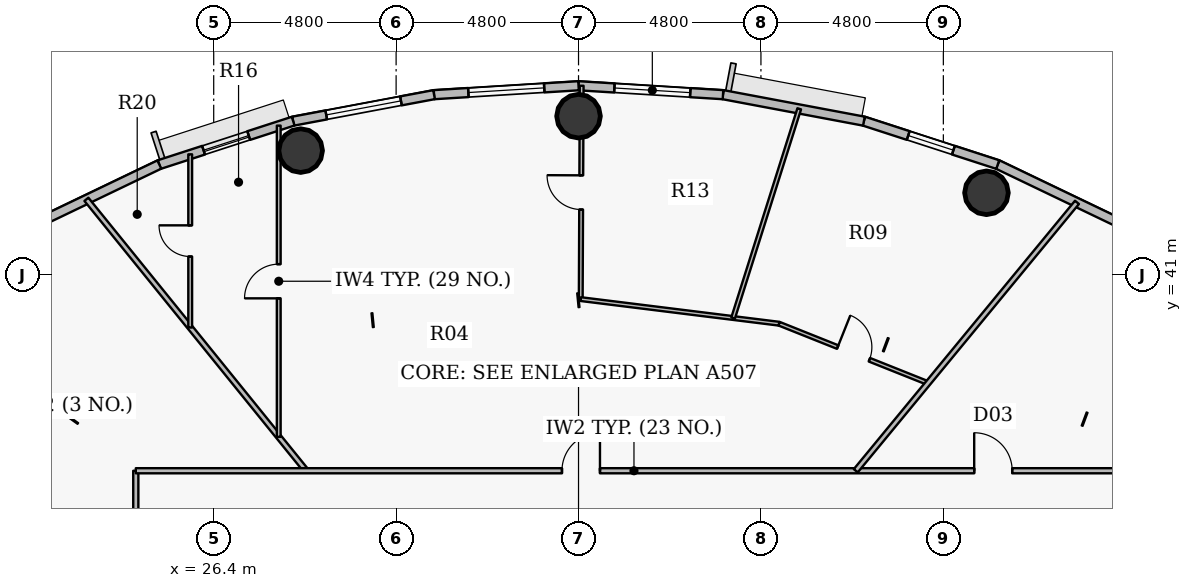
"""IFC4 building model, lengths in metres.
Left out: names, types, materials, properties, quantities, classifications, styles, units other than length and angle.
Written with IfcOpenShell. Run it as: python <this file> out.ifc"""

import sys

from ifc_helpers import new_model, si_unit, direction, frame, frame_2d, origin, origin_2d, place, context, subcontext, project, spatial, rectangle, hollow_circle, extrude, source, transform, mapped, element, fill, save


model = new_model("IFC4")
c1 = context("Model", 3, precision=1e-05, world=origin(), true_north=direction((0.0, 1.0)))
c2 = subcontext(c1, "Body", "Model", "MODEL_VIEW")
j1 = project(units=[si_unit("LENGTHUNIT", "METRE"), si_unit("PLANEANGLEUNIT", "RADIAN")], contexts=[c1])
p1 = place(None, origin())
s1 = spatial("IfcSite", under=j1, at=p1, CompositionType="ELEMENT")
p2 = place(p1, origin())
s2 = spatial("IfcBuilding", under=s1, at=p2, CompositionType="ELEMENT")
p3 = place(p2, frame((0.0, 0.0, 247.8)))
s3 = spatial("IfcBuildingStorey", under=s2, at=p3, CompositionType="ELEMENT", Elevation=247.8)
for number, where, z_axis, x_axis in (
    (1, (46.735, 43.164, 0.0), (0.0, 0.0, 1.0), (1.0, 0.0, 0.0)),
    (2, (36.0, 45.18, 0.0), (0.0, 0.0, 1.0), (1.0, 0.0, 0.0)),
    (3, (28.688, 44.273, 0.0), (0.0, 0.0, 1.0), (1.0, 0.0, 0.0)),
):
    element("IfcColumn", number, at=place(p3, frame(where, z_axis=z_axis, x_axis=x_axis)), inside=s3, PredefinedType="COLUMN", context=c2, shape_type="SweptSolid", body=[
        extrude(hollow_circle(Radius=0.575, WallThickness=0.036, at=origin_2d()), origin(), (0.0, 0.0, 1.0), 3.75),
    ])
p4 = place(p3, frame((47.031, 43.906, 0.0), z_axis=(0.0, 0.0, 1.0), x_axis=(0.901598104751, -0.432574684313, 0.0)))
e4 = element("IfcWall", 4, at=p4, inside=s3, PredefinedType="SOLIDWALL", context=c2, shape_type="SweptSolid", body=[
    extrude(rectangle(XDim=3.604, YDim=0.24, at=frame_2d((1.802, 0.0))), origin(), (0.0, 0.0, 1.0), 3.5),
])
p5 = place(p3, frame((43.509, 45.049, 0.0), z_axis=(0.0, 0.0, 1.0), x_axis=(0.951210789182, -0.308541787354, 0.0)))
e5 = element("IfcWall", 5, at=p5, inside=s3, PredefinedType="SOLIDWALL", context=c2, shape_type="SweptSolid", body=[
    extrude(rectangle(XDim=3.702, YDim=0.24, at=frame_2d((1.851, 0.0))), origin(), (0.0, 0.0, 1.0), 3.5),
])
p6 = place(p5, frame((1.226, 0.0, 0.9)))
e6 = element("IfcOpeningElement", 6, at=p6, cuts=e5, PredefinedType="OPENING", context=c2, shape_type="SweptSolid", body=[
    extrude(rectangle(XDim=1.25, YDim=1.65, at=origin_2d()), frame((0.625, 0.13, 0.825), z_axis=(0.0, -1.0, 0.0), x_axis=(1.0, 0.0, 0.0)), (0.0, 0.0, 1.0), 0.26),
])
p7 = place(p3, frame((39.802, 45.746, 0.0), z_axis=(0.0, 0.0, 1.0), x_axis=(0.982784898575, -0.184753465822, 0.0)))
e7 = element("IfcWall", 7, at=p7, inside=s3, PredefinedType="SOLIDWALL", context=c2, shape_type="SweptSolid", body=[
    extrude(rectangle(XDim=3.773, YDim=0.24, at=frame_2d((1.886, 0.0))), origin(), (0.0, 0.0, 1.0), 3.5),
])
p8 = place(p3, frame((36.0, 45.98, 0.0), z_axis=(0.0, 0.0, 1.0), x_axis=(0.998108785312, -0.06147237333, 0.0)))
e8 = element("IfcWall", 8, at=p8, inside=s3, PredefinedType="SOLIDWALL", context=c2, shape_type="SweptSolid", body=[
    extrude(rectangle(XDim=3.809, YDim=0.24, at=frame_2d((1.904, 0.0))), origin(), (0.0, 0.0, 1.0), 3.5),
])
p9 = place(p8, frame((0.946, 0.0, 0.9)))
e9 = element("IfcOpeningElement", 9, at=p9, cuts=e8, PredefinedType="OPENING", context=c2, shape_type="SweptSolid", body=[
    extrude(rectangle(XDim=2.0, YDim=1.75, at=origin_2d()), frame((1.0, 0.13, 0.875), z_axis=(0.0, -1.0, 0.0), x_axis=(1.0, 0.0, 0.0)), (0.0, 0.0, 1.0), 0.26),
])
p10 = place(p3, frame((32.198, 45.746, 0.0), z_axis=(0.0, 0.0, 1.0), x_axis=(0.998108785312, 0.06147237333, 0.0)))
e10 = element("IfcWall", 10, at=p10, inside=s3, PredefinedType="SOLIDWALL", context=c2, shape_type="SweptSolid", body=[
    extrude(rectangle(XDim=3.809, YDim=0.24, at=frame_2d((1.904, 0.0))), origin(), (0.0, 0.0, 1.0), 3.5),
])
p11 = place(p10, frame((0.905, 0.0, 0.9)))
e11 = element("IfcOpeningElement", 11, at=p11, cuts=e10, PredefinedType="OPENING", context=c2, shape_type="SweptSolid", body=[
    extrude(rectangle(XDim=2.0, YDim=1.75, at=origin_2d()), frame((1.0, 0.13, 0.875), z_axis=(0.0, -1.0, 0.0), x_axis=(1.0, 0.0, 0.0)), (0.0, 0.0, 1.0), 0.26),
])
p12 = place(p3, frame((28.491, 45.049, 0.0), z_axis=(0.0, 0.0, 1.0), x_axis=(0.982784898575, 0.184753465822, 0.0)))
e12 = element("IfcWall", 12, at=p12, inside=s3, PredefinedType="SOLIDWALL", context=c2, shape_type="SweptSolid", body=[
    extrude(rectangle(XDim=3.773, YDim=0.24, at=frame_2d((1.886, 0.0))), origin(), (0.0, 0.0, 1.0), 3.5),
])
p13 = place(p12, frame((0.886, 0.0, 0.9)))
e13 = element("IfcOpeningElement", 13, at=p13, cuts=e12, PredefinedType="OPENING", context=c2, shape_type="SweptSolid", body=[
    extrude(rectangle(XDim=2.0, YDim=1.75, at=origin_2d()), frame((1.0, 0.13, 0.875), z_axis=(0.0, -1.0, 0.0), x_axis=(1.0, 0.0, 0.0)), (0.0, 0.0, 1.0), 0.26),
])
p14 = place(p3, frame((24.969, 43.906, 0.0), z_axis=(0.0, 0.0, 1.0), x_axis=(0.951210789182, 0.308541787354, 0.0)))
e14 = element("IfcWall", 14, at=p14, inside=s3, PredefinedType="SOLIDWALL", context=c2, shape_type="SweptSolid", body=[
    extrude(rectangle(XDim=3.702, YDim=0.24, at=frame_2d((1.851, 0.0))), origin(), (0.0, 0.0, 1.0), 3.5),
])
p15 = place(p14, frame((1.223, 0.0, 0.9)))
e15 = element("IfcOpeningElement", 15, at=p15, cuts=e14, PredefinedType="OPENING", context=c2, shape_type="SweptSolid", body=[
    extrude(rectangle(XDim=1.25, YDim=1.65, at=origin_2d()), frame((0.625, 0.13, 0.825), z_axis=(0.0, -1.0, 0.0), x_axis=(1.0, 0.0, 0.0)), (0.0, 0.0, 1.0), 0.26),
])
p16 = place(p3, frame((21.72, 42.348, 0.0), z_axis=(0.0, 0.0, 1.0), x_axis=(0.901598104751, 0.432574684313, 0.0)))
e16 = element("IfcWall", 16, at=p16, inside=s3, PredefinedType="SOLIDWALL", context=c2, shape_type="SweptSolid", body=[
    extrude(rectangle(XDim=3.604, YDim=0.24, at=frame_2d((1.802, 0.0))), origin(), (0.0, 0.0, 1.0), 3.5),
])
p17 = place(p3, frame((23.05, 42.991, 0.0), z_axis=(0.0, 0.0, 1.0), x_axis=(0.629320507303, -0.777145867317, 0.0)))
e17 = element("IfcWall", 17, at=p17, inside=s3, PredefinedType="PARTITIONING", context=c2, shape_type="SweptSolid", body=[
    extrude(rectangle(XDim=9.189, YDim=0.135, at=frame_2d((4.595, 0.0))), origin(), (0.0, 0.0, 1.0), 2.985),
])
p18 = place(p3, frame((24.35, 28.019, 0.0), z_axis=(0.0, 0.0, 1.0), x_axis=(0.0, 1.0, 0.0)))
e18 = element("IfcWall", 18, at=p18, inside=s3, PredefinedType="PARTITIONING", context=c2, shape_type="SweptSolid", body=[
    extrude(rectangle(XDim=7.831, YDim=0.135, at=frame_2d((3.916, 0.0))), origin(), (0.0, 0.0, 1.0), 2.935),
])
p19 = place(p18, frame((4.435, 0.0, 0.0)))
e19 = element("IfcOpeningElement", 19, at=p19, cuts=e18, PredefinedType="OPENING", context=c2, shape_type="SweptSolid", body=[
    extrude(rectangle(XDim=1.05, YDim=2.15, at=origin_2d()), frame((0.525, 0.078, 1.075), z_axis=(0.0, -1.0, 0.0), x_axis=(1.0, 0.0, 0.0)), (0.0, 0.0, 1.0), 0.155),
])
p20 = place(p18, frame((0.674, 0.0, 0.0)))
e20 = element("IfcOpeningElement", 20, at=p20, cuts=e18, PredefinedType="OPENING", context=c2, shape_type="SweptSolid", body=[
    extrude(rectangle(XDim=0.82, YDim=2.1, at=origin_2d()), frame((0.41, 0.078, 1.05), z_axis=(0.0, -1.0, 0.0), x_axis=(1.0, 0.0, 0.0)), (0.0, 0.0, 1.0), 0.155),
])
p21 = place(p3, frame((24.35, 35.85, 0.0), z_axis=(0.0, 0.0, 1.0), x_axis=(1.0, 0.0, 0.0)))
e21 = element("IfcWall", 21, at=p21, inside=s3, PredefinedType="PARTITIONING", context=c2, shape_type="SweptSolid", body=[
    extrude(rectangle(XDim=26.218, YDim=0.135, at=frame_2d((13.109, 0.0))), origin(), (0.0, 0.0, 1.0), 2.935),
])
p22 = place(p21, frame((22.062, 0.0, 0.0)))
e22 = element("IfcOpeningElement", 22, at=p22, cuts=e21, PredefinedType="OPENING", context=c2, shape_type="SweptSolid", body=[
    extrude(rectangle(XDim=1.0, YDim=2.15, at=origin_2d()), frame((0.5, 0.078, 1.075), z_axis=(0.0, -1.0, 0.0), x_axis=(1.0, 0.0, 0.0)), (0.0, 0.0, 1.0), 0.155),
])
p23 = place(p21, frame((11.214, 0.0, 0.0)))
e23 = element("IfcOpeningElement", 23, at=p23, cuts=e21, PredefinedType="OPENING", context=c2, shape_type="SweptSolid", body=[
    extrude(rectangle(XDim=1.0, YDim=2.15, at=origin_2d()), frame((0.5, 0.078, 1.075), z_axis=(0.0, -1.0, 0.0), x_axis=(1.0, 0.0, 0.0)), (0.0, 0.0, 1.0), 0.155),
])
p24 = place(p3, frame((25.782, 39.619, 0.0), z_axis=(0.0, 0.0, 1.0), x_axis=(0.0, 1.0, 0.0)))
e24 = element("IfcWall", 24, at=p24, inside=s3, PredefinedType="PARTITIONING", context=c2, shape_type="SweptSolid", body=[
    extrude(rectangle(XDim=4.557, YDim=0.1, at=frame_2d((2.278, 0.0))), origin(), (0.0, 0.0, 1.0), 2.985),
])
p25 = place(p24, frame((1.868, 0.0, 0.0)))
e25 = element("IfcOpeningElement", 25, at=p25, cuts=e24, PredefinedType="OPENING", context=c2, shape_type="SweptSolid", body=[
    extrude(rectangle(XDim=0.82, YDim=2.1, at=origin_2d()), frame((0.41, 0.06, 1.05), z_axis=(0.0, -1.0, 0.0), x_axis=(1.0, 0.0, 0.0)), (0.0, 0.0, 1.0), 0.12),
])
p26 = place(p3, frame((28.111, 36.742, 0.0), z_axis=(0.0, 0.0, 1.0), x_axis=(0.0, 1.0, 0.0)))
e26 = element("IfcWall", 26, at=p26, inside=s3, PredefinedType="PARTITIONING", context=c2, shape_type="SweptSolid", body=[
    extrude(rectangle(XDim=8.189, YDim=0.1, at=frame_2d((4.095, 0.0))), origin(), (0.0, 0.0, 1.0), 2.985),
])
p27 = place(p26, frame((3.645, 0.0, 0.0)))
e27 = element("IfcOpeningElement", 27, at=p27, cuts=e26, PredefinedType="OPENING", context=c2, shape_type="SweptSolid", body=[
    extrude(rectangle(XDim=0.9, YDim=2.1, at=origin_2d()), frame((0.45, 0.06, 1.05), z_axis=(0.0, -1.0, 0.0), x_axis=(1.0, 0.0, 0.0)), (0.0, 0.0, 1.0), 0.12),
])
p28 = place(p3, frame((36.058, 40.366, 0.0), z_axis=(0.0, 0.0, 1.0), x_axis=(0.004348919472, 0.999990543405, 0.0)))
e28 = element("IfcWall", 28, at=p28, inside=s3, PredefinedType="PARTITIONING", context=c2, shape_type="SweptSolid", body=[
    extrude(rectangle(XDim=5.614, YDim=0.1, at=frame_2d((2.807, 0.0))), origin(), (0.0, 0.0, 1.0), 2.935),
])
p29 = place(p28, frame((2.357, 0.0, 0.0)))
e29 = element("IfcOpeningElement", 29, at=p29, cuts=e28, PredefinedType="OPENING", context=c2, shape_type="SweptSolid", body=[
    extrude(rectangle(XDim=0.9, YDim=2.1, at=origin_2d()), frame((0.45, 0.06, 1.05), z_axis=(0.0, -1.0, 0.0), x_axis=(1.0, 0.0, 0.0)), (0.0, 0.0, 1.0), 0.12),
])
p30 = place(p3, frame((36.058, 40.366, 0.0), z_axis=(0.0, 0.0, 1.0), x_axis=(0.9924002173, -0.123052056879, 0.0)))
e30 = element("IfcWall", 30, at=p30, inside=s3, PredefinedType="PARTITIONING", context=c2, shape_type="SweptSolid", body=[
    extrude(rectangle(XDim=5.26, YDim=0.1, at=frame_2d((2.63, 0.0))), origin(), (0.0, 0.0, 1.0), 2.935),
])
p31 = place(p3, frame((40.068, 39.869, 0.0), z_axis=(0.0, 0.0, 1.0), x_axis=(0.301434937635, 0.953486747875, 0.0)))
e31 = element("IfcWall", 31, at=p31, inside=s3, PredefinedType="PARTITIONING", context=c2, shape_type="SweptSolid", body=[
    extrude(rectangle(XDim=5.773, YDim=0.1, at=frame_2d((2.887, 0.0))), origin(), (0.0, 0.0, 1.0), 2.985),
])
p32 = place(p3, frame((41.278, 39.719, 0.0), z_axis=(0.0, 0.0, 1.0), x_axis=(0.928799648329, -0.370582262478, 0.0)))
e32 = element("IfcWall", 32, at=p32, inside=s3, PredefinedType="PARTITIONING", context=c2, shape_type="SweptSolid", body=[
    extrude(rectangle(XDim=4.218, YDim=0.1, at=frame_2d((2.109, 0.0))), origin(), (0.0, 0.0, 1.0), 2.935),
])
p33 = place(p32, frame((1.659, 0.0, 0.0)))
e33 = element("IfcOpeningElement", 33, at=p33, cuts=e32, PredefinedType="OPENING", context=c2, shape_type="SweptSolid", body=[
    extrude(rectangle(XDim=0.9, YDim=2.1, at=origin_2d()), frame((0.45, 0.06, 1.05), z_axis=(0.0, -1.0, 0.0), x_axis=(1.0, 0.0, 0.0)), (0.0, 0.0, 1.0), 0.12),
])
p34 = place(p3, frame((43.295, 35.85, 0.0), z_axis=(0.0, 0.0, 1.0), x_axis=(0.636076542552, 0.771625966395, 0.0)))
e34 = element("IfcWall", 34, at=p34, inside=s3, PredefinedType="PARTITIONING", context=c2, shape_type="SweptSolid", body=[
    extrude(rectangle(XDim=9.151, YDim=0.135, at=frame_2d((4.576, 0.0))), origin(), (0.0, 0.0, 1.0), 2.985),
])
m1 = source(origin(), c2, "Body", "SweptSolid", [
    extrude(rectangle(XDim=2.0, YDim=1.75, at=origin_2d()), frame((1.0, 0.03, 0.875), z_axis=(0.0, -1.0, 0.0), x_axis=(1.0, 0.0, 0.0)), (0.0, 0.0, 1.0), 0.06),
])
p35 = place(p9, origin())
e35 = element("IfcWindow", 35, at=p35, inside=s3, PartitioningType="DOUBLE_PANEL_VERTICAL", PredefinedType="WINDOW", context=c2, shape_type="MappedRepresentation", body=[
    mapped(m1, transform((0.0, 0.0, 0.0), x_axis=(1.0, 0.0, 0.0), y_axis=(0.0, 1.0, 0.0), z_axis=(0.0, 0.0, 1.0), scale=1.0)),
])
fill(e9, e35)
p36 = place(p11, origin())
e36 = element("IfcWindow", 36, at=p36, inside=s3, PartitioningType="DOUBLE_PANEL_VERTICAL", PredefinedType="WINDOW", context=c2, shape_type="MappedRepresentation", body=[
    mapped(m1, transform((0.0, 0.0, 0.0), x_axis=(1.0, 0.0, 0.0), y_axis=(0.0, 1.0, 0.0), z_axis=(0.0, 0.0, 1.0), scale=1.0)),
])
fill(e11, e36)
p37 = place(p13, origin())
e37 = element("IfcWindow", 37, at=p37, inside=s3, PartitioningType="DOUBLE_PANEL_VERTICAL", PredefinedType="WINDOW", context=c2, shape_type="MappedRepresentation", body=[
    mapped(m1, transform((0.0, 0.0, 0.0), x_axis=(1.0, 0.0, 0.0), y_axis=(0.0, 1.0, 0.0), z_axis=(0.0, 0.0, 1.0), scale=1.0)),
])
fill(e13, e37)
m2 = source(origin(), c2, "Body", "SweptSolid", [
    extrude(rectangle(XDim=1.25, YDim=1.65, at=origin_2d()), frame((0.625, 0.03, 0.825), z_axis=(0.0, -1.0, 0.0), x_axis=(1.0, 0.0, 0.0)), (0.0, 0.0, 1.0), 0.06),
])
p38 = place(p15, origin())
e38 = element("IfcWindow", 38, at=p38, inside=s3, PartitioningType="SINGLE_PANEL", PredefinedType="WINDOW", context=c2, shape_type="MappedRepresentation", body=[
    mapped(m2, transform((0.0, 0.0, 0.0), x_axis=(1.0, 0.0, 0.0), y_axis=(0.0, 1.0, 0.0), z_axis=(0.0, 0.0, 1.0), scale=1.0)),
])
fill(e15, e38)
p39 = place(p6, origin())
e39 = element("IfcWindow", 39, at=p39, inside=s3, PartitioningType="SINGLE_PANEL", PredefinedType="WINDOW", context=c2, shape_type="MappedRepresentation", body=[
    mapped(m2, transform((0.0, 0.0, 0.0), x_axis=(1.0, 0.0, 0.0), y_axis=(0.0, 1.0, 0.0), z_axis=(0.0, 0.0, 1.0), scale=1.0)),
])
fill(e6, e39)
m3 = source(origin(), c2, "Body", "SweptSolid", [
    extrude(rectangle(XDim=1.0, YDim=2.15, at=origin_2d()), frame((0.5, 0.025, 1.075), z_axis=(0.0, -1.0, 0.0), x_axis=(1.0, 0.0, 0.0)), (0.0, 0.0, 1.0), 0.05),
])
p40 = place(p22, origin())
e40 = element("IfcDoor", 40, at=p40, inside=s3, OperationType="SINGLE_SWING_LEFT", PredefinedType="DOOR", context=c2, shape_type="MappedRepresentation", body=[
    mapped(m3, transform((0.0, 0.0, 0.0), x_axis=(1.0, 0.0, 0.0), y_axis=(0.0, 1.0, 0.0), z_axis=(0.0, 0.0, 1.0), scale=1.0)),
])
fill(e22, e40)
p41 = place(p23, origin())
e41 = element("IfcDoor", 41, at=p41, inside=s3, OperationType="SINGLE_SWING_RIGHT", PredefinedType="DOOR", context=c2, shape_type="MappedRepresentation", body=[
    mapped(m3, transform((0.0, 0.0, 0.0), x_axis=(1.0, 0.0, 0.0), y_axis=(0.0, 1.0, 0.0), z_axis=(0.0, 0.0, 1.0), scale=1.0)),
])
fill(e23, e41)
m4 = source(origin(), c2, "Body", "SweptSolid", [
    extrude(rectangle(XDim=0.9, YDim=2.1, at=origin_2d()), frame((0.45, 0.025, 1.05), z_axis=(0.0, -1.0, 0.0), x_axis=(1.0, 0.0, 0.0)), (0.0, 0.0, 1.0), 0.05),
])
p42 = place(p33, origin())
e42 = element("IfcDoor", 42, at=p42, inside=s3, OperationType="SINGLE_SWING_LEFT", PredefinedType="DOOR", context=c2, shape_type="MappedRepresentation", body=[
    mapped(m4, transform((0.0, 0.0, 0.0), x_axis=(1.0, 0.0, 0.0), y_axis=(0.0, 1.0, 0.0), z_axis=(0.0, 0.0, 1.0), scale=1.0)),
])
fill(e33, e42)
p43 = place(p29, origin())
e43 = element("IfcDoor", 43, at=p43, inside=s3, OperationType="SINGLE_SWING_RIGHT", PredefinedType="DOOR", context=c2, shape_type="MappedRepresentation", body=[
    mapped(m4, transform((0.0, 0.0, 0.0), x_axis=(1.0, 0.0, 0.0), y_axis=(0.0, 1.0, 0.0), z_axis=(0.0, 0.0, 1.0), scale=1.0)),
])
fill(e29, e43)
p44 = place(p27, origin())
e44 = element("IfcDoor", 44, at=p44, inside=s3, OperationType="SINGLE_SWING_LEFT", PredefinedType="DOOR", context=c2, shape_type="MappedRepresentation", body=[
    mapped(m4, transform((0.0, 0.0, 0.0), x_axis=(1.0, 0.0, 0.0), y_axis=(0.0, 1.0, 0.0), z_axis=(0.0, 0.0, 1.0), scale=1.0)),
])
fill(e27, e44)
m5 = source(origin(), c2, "Body", "SweptSolid", [
    extrude(rectangle(XDim=0.82, YDim=2.1, at=origin_2d()), frame((0.41, 0.025, 1.05), z_axis=(0.0, -1.0, 0.0), x_axis=(1.0, 0.0, 0.0)), (0.0, 0.0, 1.0), 0.05),
])
p45 = place(p25, origin())
e45 = element("IfcDoor", 45, at=p45, inside=s3, OperationType="SINGLE_SWING_RIGHT", PredefinedType="DOOR", context=c2, shape_type="MappedRepresentation", body=[
    mapped(m5, transform((0.0, 0.0, 0.0), x_axis=(1.0, 0.0, 0.0), y_axis=(0.0, 1.0, 0.0), z_axis=(0.0, 0.0, 1.0), scale=1.0)),
])
fill(e25, e45)
save(model, sys.argv[1])
